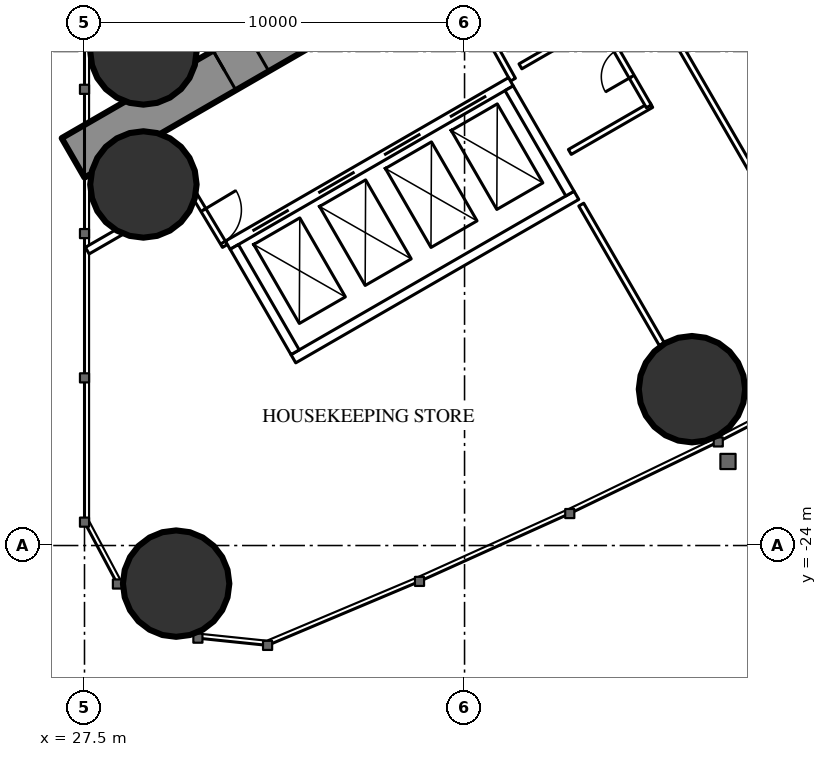
"""IFC4 building model, lengths in metres.
Left out: names, types, materials, properties, quantities, classifications, styles, units other than length and angle.
Written with IfcOpenShell. Run it as: python <this file> out.ifc"""

import sys

from ifc_helpers import new_model, si_unit, direction, frame, frame_2d, origin, origin_2d, place, context, subcontext, project, spatial, rectangle, hollow_circle, extrude, element, fill, save


model = new_model("IFC4")
c1 = context("Model", 3, precision=1e-05, world=origin(), true_north=direction((0.0, 1.0)))
c2 = subcontext(c1, "Body", "Model", "MODEL_VIEW")
j1 = project(units=[si_unit("LENGTHUNIT", "METRE"), si_unit("PLANEANGLEUNIT", "RADIAN")], contexts=[c1])
p1 = place(None, origin())
s1 = spatial("IfcSite", under=j1, at=p1, CompositionType="ELEMENT")
p2 = place(p1, origin())
s2 = spatial("IfcBuilding", under=s1, at=p2, CompositionType="ELEMENT")
p3 = place(p2, frame((0.0, 0.0, 74.0)))
s3 = spatial("IfcBuildingStorey", under=s2, at=p3, CompositionType="ELEMENT", Elevation=74.0)
for number, where, z_axis, x_axis in (
    (1, (29.911, -25.002, 0.0), (0.0, 0.0, 1.0), (1.0, 0.0, 0.0)),
    (2, (29.05, -11.0, 0.0), (0.0, 0.0, 1.0), (1.0, 0.0, 0.0)),
    (3, (29.05, -14.5, 0.0), (0.0, 0.0, 1.0), (1.0, 0.0, 0.0)),
    (4, (43.484, -19.886, 0.0), (0.0, 0.0, 1.0), (1.0, 0.0, 0.0)),
):
    element("IfcColumn", number, at=place(p3, frame(where, z_axis=z_axis, x_axis=x_axis)), inside=s3, PredefinedType="COLUMN", context=c2, shape_type="SweptSolid", body=[
        extrude(hollow_circle(Radius=1.4, WallThickness=0.12, at=origin_2d()), origin(), (0.0, 0.0, 1.0), 3.5),
    ])
p4 = place(p3, frame((27.2, -13.8, 0.0), z_axis=(0.0, 0.0, 1.0), x_axis=(0.866027159892, 0.499996958321, 0.0)))
e5 = element("IfcWall", 5, at=p4, inside=s3, PredefinedType="SHEAR", context=c2, shape_type="SweptSolid", body=[
    extrude(rectangle(XDim=27.947, YDim=1.2, at=frame_2d((13.973, 0.0))), origin(), (0.0, 0.0, 1.0), 3.5),
])
p5 = place(p4, frame((4.6, 0.0, 0.0)))
e6 = element("IfcOpeningElement", 6, at=p5, cuts=e5, PredefinedType="OPENING", context=c2, shape_type="SweptSolid", body=[
    extrude(rectangle(XDim=1.0, YDim=2.2, at=frame_2d((0.5, 1.1))), frame((0.0, 0.61, 0.0), z_axis=(0.0, -1.0, 0.0), x_axis=(1.0, 0.0, 0.0)), (0.0, 0.0, 1.0), 1.22),
])
p6 = place(p4, frame((13.395, 0.0, 0.0)))
e7 = element("IfcOpeningElement", 7, at=p6, cuts=e5, PredefinedType="OPENING", context=c2, shape_type="SweptSolid", body=[
    extrude(rectangle(XDim=1.8, YDim=2.2, at=frame_2d((0.9, 1.1))), frame((0.0, 0.61, 0.0), z_axis=(0.0, -1.0, 0.0), x_axis=(1.0, 0.0, 0.0)), (0.0, 0.0, 1.0), 1.22),
])
p7 = place(p3, frame((41.647, -8.23, 0.0), z_axis=(0.0, 0.0, 1.0), x_axis=(0.49998590462, -0.866033541603, 0.0)))
e8 = element("IfcWall", 8, at=p7, inside=s3, PredefinedType="PARTITIONING", context=c2, shape_type="SweptSolid", body=[
    extrude(rectangle(XDim=12.621, YDim=0.15, at=frame_2d((6.311, 0.0))), origin(), (0.0, 0.0, 1.0), 3.25),
])
p8 = place(p3, frame((40.57, -15.03, 0.0), z_axis=(0.0, 0.0, 1.0), x_axis=(0.500012993597, -0.866017901798, 0.0)))
e9 = element("IfcWall", 9, at=p8, inside=s3, PredefinedType="PARTITIONING", context=c2, shape_type="SweptSolid", body=[
    extrude(rectangle(XDim=4.243, YDim=0.15, at=frame_2d((2.122, 0.0))), origin(), (0.0, 0.0, 1.0), 3.25),
])
p9 = place(p3, frame((27.572, -16.241, 0.0), z_axis=(0.0, 0.0, 1.0), x_axis=(0.866029654818, 0.499992636921, 0.0)))
e10 = element("IfcWall", 10, at=p9, inside=s3, PredefinedType="PARTITIONING", context=c2, shape_type="SweptSolid", body=[
    extrude(rectangle(XDim=3.155, YDim=0.2, at=frame_2d((1.577, 0.0))), origin(), (0.0, 0.0, 1.0), 3.25),
])
p10 = place(p3, frame((38.773, -11.742, 0.0), z_axis=(0.0, 0.0, 1.0), x_axis=(-0.485528096672, 0.8742210632, 0.0)))
e11 = element("IfcWall", 11, at=p10, inside=s3, PredefinedType="PARTITIONING", context=c2, shape_type="SweptSolid", body=[
    extrude(rectangle(XDim=1.805, YDim=0.15, at=frame_2d((0.903, 0.0))), origin(), (0.0, 0.0, 1.0), 3.25),
])
p11 = place(p3, frame((30.267, -14.569, 0.0), z_axis=(0.0, 0.0, 1.0), x_axis=(0.514336634837, -0.857588377991, 0.0)))
e12 = element("IfcWall", 12, at=p11, inside=s3, PredefinedType="PARTITIONING", context=c2, shape_type="SweptSolid", body=[
    extrude(rectangle(XDim=1.805, YDim=0.15, at=frame_2d((0.903, 0.0))), origin(), (0.0, 0.0, 1.0), 3.25),
])
p12 = place(p11, frame((0.703, 0.0, 0.0)))
e13 = element("IfcOpeningElement", 13, at=p12, cuts=e12, PredefinedType="OPENING", context=c2, shape_type="SweptSolid", body=[
    extrude(rectangle(XDim=1.0, YDim=2.2, at=frame_2d((0.5, 1.1))), frame((0.0, 0.085, 0.0), z_axis=(0.0, -1.0, 0.0), x_axis=(1.0, 0.0, 0.0)), (0.0, 0.0, 1.0), 0.17),
])
p13 = place(p3, frame((40.27, -13.644, 0.0), z_axis=(0.0, 0.0, 1.0), x_axis=(0.866031185235, 0.4999899861, 0.0)))
e14 = element("IfcWall", 14, at=p13, inside=s3, PredefinedType="PARTITIONING", context=c2, shape_type="SweptSolid", body=[
    extrude(rectangle(XDim=2.475, YDim=0.15, at=frame_2d((1.238, 0.0))), origin(), (0.0, 0.0, 1.0), 3.25),
])
p14 = place(p3, frame((41.048, -10.193, 0.0), z_axis=(0.0, 0.0, 1.0), x_axis=(0.500047596559, -0.865997922154, 0.0)))
e15 = element("IfcWall", 15, at=p14, inside=s3, PredefinedType="PARTITIONING", context=c2, shape_type="SweptSolid", body=[
    extrude(rectangle(XDim=2.6, YDim=0.15, at=frame_2d((1.3, 0.0))), origin(), (0.0, 0.0, 1.0), 3.25),
])
p15 = place(p14, frame((0.9, 0.0, 0.0)))
e16 = element("IfcOpeningElement", 16, at=p15, cuts=e15, PredefinedType="OPENING", context=c2, shape_type="SweptSolid", body=[
    extrude(rectangle(XDim=0.8, YDim=2.2, at=frame_2d((0.4, 1.1))), frame((0.0, 0.085, 0.0), z_axis=(0.0, -1.0, 0.0), x_axis=(1.0, 0.0, 0.0)), (0.0, 0.0, 1.0), 0.17),
])
p16 = place(p3, frame((38.97, -11.393, 0.0), z_axis=(0.0, 0.0, 1.0), x_axis=(0.866031185235, 0.4999899861, 0.0)))
e17 = element("IfcWall", 17, at=p16, inside=s3, PredefinedType="PARTITIONING", context=c2, shape_type="SweptSolid", body=[
    extrude(rectangle(XDim=2.475, YDim=0.15, at=frame_2d((1.238, 0.0))), origin(), (0.0, 0.0, 1.0), 3.25),
])
p17 = place(p3, frame((31.271, -16.097, 0.0), z_axis=(0.0, 0.0, 1.0), x_axis=(0.86604045752, 0.499973925258, 0.0)))
e18 = element("IfcWall", 18, at=p17, inside=s3, PredefinedType="PARTITIONING", context=c2, shape_type="SweptSolid", body=[
    extrude(rectangle(XDim=8.6, YDim=0.25, at=frame_2d((4.3, 0.0))), origin(), (0.0, 0.0, 1.0), 3.25),
])
p18 = place(p17, frame((0.75, 0.0, 0.0)))
e19 = element("IfcOpeningElement", 19, at=p18, cuts=e18, PredefinedType="OPENING", context=c2, shape_type="SweptSolid", body=[
    extrude(rectangle(XDim=1.1, YDim=2.2, at=frame_2d((0.55, 1.1))), frame((0.0, 0.135, 0.0), z_axis=(0.0, -1.0, 0.0), x_axis=(1.0, 0.0, 0.0)), (0.0, 0.0, 1.0), 0.27),
])
p19 = place(p17, frame((2.75, 0.0, 0.0)))
e20 = element("IfcOpeningElement", 20, at=p19, cuts=e18, PredefinedType="OPENING", context=c2, shape_type="SweptSolid", body=[
    extrude(rectangle(XDim=1.1, YDim=2.2, at=frame_2d((0.55, 1.1))), frame((0.0, 0.135, 0.0), z_axis=(0.0, -1.0, 0.0), x_axis=(1.0, 0.0, 0.0)), (0.0, 0.0, 1.0), 0.27),
])
p20 = place(p17, frame((4.75, 0.0, 0.0)))
e21 = element("IfcOpeningElement", 21, at=p20, cuts=e18, PredefinedType="OPENING", context=c2, shape_type="SweptSolid", body=[
    extrude(rectangle(XDim=1.1, YDim=2.2, at=frame_2d((0.55, 1.1))), frame((0.0, 0.135, 0.0), z_axis=(0.0, -1.0, 0.0), x_axis=(1.0, 0.0, 0.0)), (0.0, 0.0, 1.0), 0.27),
])
p21 = place(p17, frame((6.75, 0.0, 0.0)))
e22 = element("IfcOpeningElement", 22, at=p21, cuts=e18, PredefinedType="OPENING", context=c2, shape_type="SweptSolid", body=[
    extrude(rectangle(XDim=1.1, YDim=2.2, at=frame_2d((0.55, 1.1))), frame((0.0, 0.135, 0.0), z_axis=(0.0, -1.0, 0.0), x_axis=(1.0, 0.0, 0.0)), (0.0, 0.0, 1.0), 0.27),
])
p22 = place(p3, frame((32.996, -19.086, 0.0), z_axis=(0.0, 0.0, 1.0), x_axis=(0.866028165386, 0.499995216735, 0.0)))
e23 = element("IfcWall", 23, at=p22, inside=s3, PredefinedType="PARTITIONING", context=c2, shape_type="SweptSolid", body=[
    extrude(rectangle(XDim=8.6, YDim=0.25, at=frame_2d((4.3, 0.0))), origin(), (0.0, 0.0, 1.0), 3.25),
])
for number, where, z_axis, x_axis in (
    (24, (31.441, -16.143, 0.0), (0.0, 0.0, 1.0), (0.5, -0.866, 0.0)),
    (25, (38.673, -11.968, 0.0), (0.0, 0.0, 1.0), (0.5, -0.866, 0.0)),
):
    element("IfcWall", number, at=place(p3, frame(where, z_axis=z_axis, x_axis=x_axis)), inside=s3, PredefinedType="PARTITIONING", context=c2, shape_type="SweptSolid", body=[
        extrude(rectangle(XDim=3.201, YDim=0.25, at=frame_2d((1.6, 0.0))), origin(), (0.0, 0.0, 1.0), 3.25),
    ])
p23 = place(p15, origin())
e26 = element("IfcDoor", 26, at=p23, inside=s3, OperationType="SINGLE_SWING_RIGHT", PredefinedType="DOOR", context=c2, shape_type="SweptSolid", body=[
    extrude(rectangle(XDim=0.8, YDim=2.2, at=frame_2d((0.4, 1.1))), frame((0.0, 0.025, 0.0), z_axis=(0.0, -1.0, 0.0), x_axis=(1.0, 0.0, 0.0)), (0.0, 0.0, 1.0), 0.05),
])
fill(e16, e26)
p24 = place(p12, origin())
e27 = element("IfcDoor", 27, at=p24, inside=s3, OperationType="SINGLE_SWING_LEFT", PredefinedType="DOOR", context=c2, shape_type="SweptSolid", body=[
    extrude(rectangle(XDim=1.0, YDim=2.2, at=frame_2d((0.5, 1.1))), frame((0.0, 0.025, 0.0), z_axis=(0.0, -1.0, 0.0), x_axis=(1.0, 0.0, 0.0)), (0.0, 0.0, 1.0), 0.05),
])
fill(e13, e27)
p25 = place(p5, origin())
e28 = element("IfcDoor", 28, at=p25, inside=s3, OperationType="SINGLE_SWING_LEFT", PredefinedType="DOOR", context=c2, shape_type="SweptSolid", body=[
    extrude(rectangle(XDim=1.0, YDim=2.2, at=frame_2d((0.5, 1.1))), frame((0.0, 0.025, 0.0), z_axis=(0.0, -1.0, 0.0), x_axis=(1.0, 0.0, 0.0)), (0.0, 0.0, 1.0), 0.05),
])
fill(e6, e28)
p26 = place(p18, origin())
e29 = element("IfcDoor", 29, at=p26, inside=s3, OperationType="DOUBLE_DOOR_SLIDING", PredefinedType="USERDEFINED", context=c2, shape_type="SweptSolid", body=[
    extrude(rectangle(XDim=1.1, YDim=2.2, at=frame_2d((0.55, 1.1))), frame((0.0, 0.025, 0.0), z_axis=(0.0, -1.0, 0.0), x_axis=(1.0, 0.0, 0.0)), (0.0, 0.0, 1.0), 0.05),
])
fill(e19, e29)
p27 = place(p19, origin())
e30 = element("IfcDoor", 30, at=p27, inside=s3, OperationType="DOUBLE_DOOR_SLIDING", PredefinedType="USERDEFINED", context=c2, shape_type="SweptSolid", body=[
    extrude(rectangle(XDim=1.1, YDim=2.2, at=frame_2d((0.55, 1.1))), frame((0.0, 0.025, 0.0), z_axis=(0.0, -1.0, 0.0), x_axis=(1.0, 0.0, 0.0)), (0.0, 0.0, 1.0), 0.05),
])
fill(e20, e30)
p28 = place(p20, origin())
e31 = element("IfcDoor", 31, at=p28, inside=s3, OperationType="DOUBLE_DOOR_SLIDING", PredefinedType="USERDEFINED", context=c2, shape_type="SweptSolid", body=[
    extrude(rectangle(XDim=1.1, YDim=2.2, at=frame_2d((0.55, 1.1))), frame((0.0, 0.025, 0.0), z_axis=(0.0, -1.0, 0.0), x_axis=(1.0, 0.0, 0.0)), (0.0, 0.0, 1.0), 0.05),
])
fill(e21, e31)
p29 = place(p21, origin())
e32 = element("IfcDoor", 32, at=p29, inside=s3, OperationType="DOUBLE_DOOR_SLIDING", PredefinedType="USERDEFINED", context=c2, shape_type="SweptSolid", body=[
    extrude(rectangle(XDim=1.1, YDim=2.2, at=frame_2d((0.55, 1.1))), frame((0.0, 0.025, 0.0), z_axis=(0.0, -1.0, 0.0), x_axis=(1.0, 0.0, 0.0)), (0.0, 0.0, 1.0), 0.05),
])
fill(e22, e32)
save(model, sys.argv[1])
